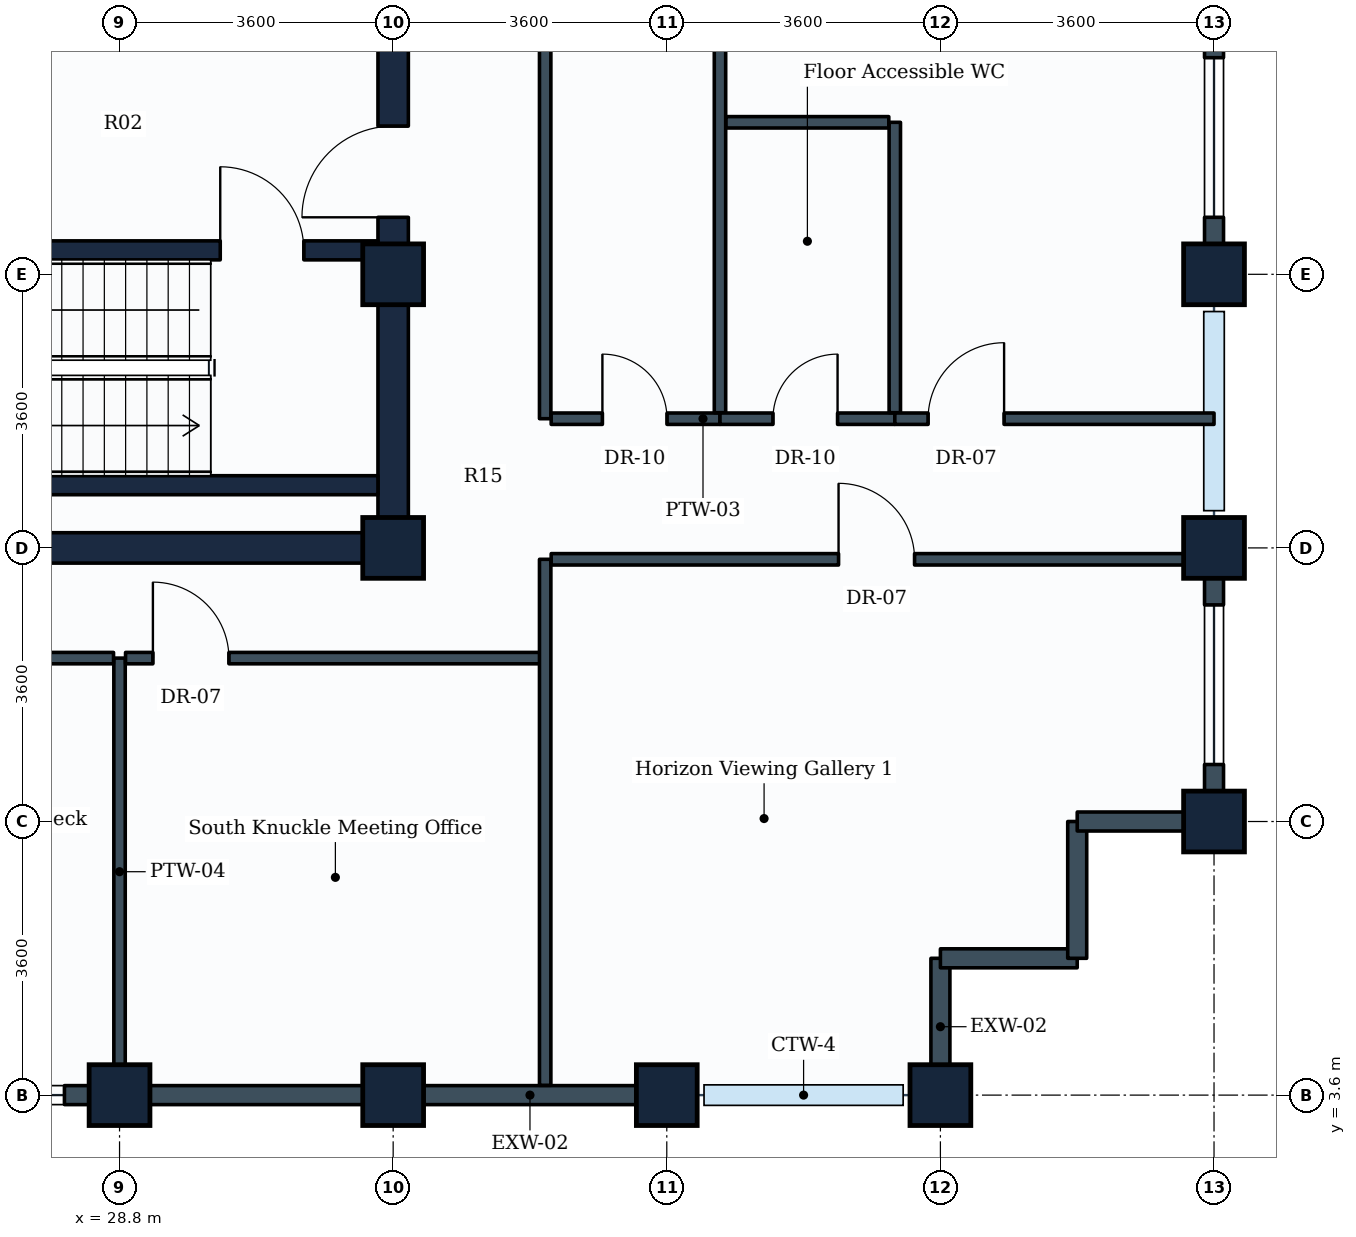
"""IFC4 building model, lengths in metres.
Left out: names, types, materials, properties, quantities, classifications, styles, units other than length and angle.
Written with IfcOpenShell. Run it as: python <this file> out.ifc"""

import sys

from ifc_helpers import new_model, si_unit, direction, frame, frame_2d, origin, origin_2d, place, context, subcontext, project, spatial, rectangle, extrude, element, fill, save


model = new_model("IFC4")
c1 = context("Model", 3, precision=1e-05, world=origin(), true_north=direction((0.0, 1.0)))
c2 = subcontext(c1, "Body", "Model", "MODEL_VIEW")
j1 = project(units=[si_unit("LENGTHUNIT", "METRE"), si_unit("PLANEANGLEUNIT", "RADIAN")], contexts=[c1])
p1 = place(None, origin())
s1 = spatial("IfcSite", under=j1, at=p1, CompositionType="ELEMENT")
p2 = place(p1, origin())
s2 = spatial("IfcBuilding", under=s1, at=p2, CompositionType="ELEMENT")
p3 = place(p2, frame((0.0, 0.0, 299.8)))
s3 = spatial("IfcBuildingStorey", under=s2, at=p3, CompositionType="ELEMENT", Elevation=299.8)
for number, where, z_axis, x_axis in (
    (1, (28.8, 3.6, 0.0), (0.0, 0.0, 1.0), (1.0, 0.0, 0.0)),
    (2, (32.4, 3.6, 0.0), (0.0, 0.0, 1.0), (1.0, 0.0, 0.0)),
    (3, (32.4, 10.8, 0.0), (0.0, 0.0, 1.0), (1.0, 0.0, 0.0)),
    (4, (32.4, 14.4, 0.0), (0.0, 0.0, 1.0), (1.0, 0.0, 0.0)),
    (5, (36.0, 3.6, 0.0), (0.0, 0.0, 1.0), (1.0, 0.0, 0.0)),
    (6, (39.6, 3.6, 0.0), (0.0, 0.0, 1.0), (1.0, 0.0, 0.0)),
    (7, (43.2, 7.2, 0.0), (0.0, 0.0, 1.0), (1.0, 0.0, 0.0)),
    (8, (43.2, 10.8, 0.0), (0.0, 0.0, 1.0), (0.0, 1.0, 0.0)),
    (9, (43.2, 14.4, 0.0), (0.0, 0.0, 1.0), (0.0, 1.0, 0.0)),
):
    element("IfcColumn", number, at=place(p3, frame(where, z_axis=z_axis, x_axis=x_axis)), inside=s3, PredefinedType="COLUMN", context=c2, shape_type="SweptSolid", body=[
        extrude(rectangle(XDim=0.8, YDim=0.8, at=origin_2d()), origin(), (0.0, 0.0, 1.0), 4.4),
    ])
p4 = place(p3, frame((28.8, 3.6, 0.0), z_axis=(0.0, 0.0, 1.0), x_axis=(-1.0, 0.0, 0.0)))
e10 = element("IfcWall", 10, at=p4, inside=s3, PredefinedType="STANDARD", context=c2, shape_type="SweptSolid", body=[
    extrude(rectangle(XDim=3.6, YDim=0.25, at=frame_2d((1.8, 0.0))), origin(), (0.0, 0.0, 1.0), 2.58),
])
p5 = place(p4, frame((0.725, 0.0, 0.85)))
e11 = element("IfcOpeningElement", 11, at=p5, cuts=e10, PredefinedType="OPENING", context=c2, shape_type="SweptSolid", body=[
    extrude(rectangle(XDim=2.1, YDim=1.35, at=frame_2d((1.05, 0.675))), frame((0.0, 0.135, 0.0), z_axis=(0.0, -1.0, 0.0), x_axis=(1.0, 0.0, 0.0)), (0.0, 0.0, 1.0), 0.27),
])
p6 = place(p3, frame((32.4, 3.6, 0.0), z_axis=(0.0, 0.0, 1.0), x_axis=(-1.0, 0.0, 0.0)))
e12 = element("IfcWall", 12, at=p6, inside=s3, PredefinedType="STANDARD", context=c2, shape_type="SweptSolid", body=[
    extrude(rectangle(XDim=3.6, YDim=0.25, at=frame_2d((1.8, 0.0))), origin(), (0.0, 0.0, 1.0), 2.58),
])
p7 = place(p3, frame((36.0, 3.6, 0.0), z_axis=(0.0, 0.0, 1.0), x_axis=(-1.0, 0.0, 0.0)))
e13 = element("IfcWall", 13, at=p7, inside=s3, PredefinedType="STANDARD", context=c2, shape_type="SweptSolid", body=[
    extrude(rectangle(XDim=3.6, YDim=0.25, at=frame_2d((1.8, 0.0))), origin(), (0.0, 0.0, 1.0), 2.58),
])
for number, where, z_axis, x_axis in (
    (14, (39.6, 5.4, 0.0), (0.0, 0.0, 1.0), (0.0, -1.0, 0.0)),
    (15, (41.4, 5.4, 0.0), (0.0, 0.0, 1.0), (-1.0, 0.0, 0.0)),
):
    element("IfcWall", number, at=place(p3, frame(where, z_axis=z_axis, x_axis=x_axis)), inside=s3, PredefinedType="STANDARD", context=c2, shape_type="SweptSolid", body=[
        extrude(rectangle(XDim=1.8, YDim=0.25, at=frame_2d((0.9, 0.0))), origin(), (0.0, 0.0, 1.0), 4.135),
    ])
for number, where, z_axis, x_axis in (
    (16, (41.4, 7.2, 0.0), (0.0, 0.0, 1.0), (0.0, -1.0, 0.0)),
    (17, (43.2, 7.2, 0.0), (0.0, 0.0, 1.0), (-1.0, 0.0, 0.0)),
):
    element("IfcWall", number, at=place(p3, frame(where, z_axis=z_axis, x_axis=x_axis)), inside=s3, PredefinedType="STANDARD", context=c2, shape_type="SweptSolid", body=[
        extrude(rectangle(XDim=1.8, YDim=0.25, at=frame_2d((0.9, 0.0))), origin(), (0.0, 0.0, 1.0), 4.135),
    ])
p8 = place(p3, frame((43.2, 10.8, 0.0), z_axis=(0.0, 0.0, 1.0), x_axis=(0.0, -1.0, 0.0)))
e18 = element("IfcWall", 18, at=p8, inside=s3, PredefinedType="STANDARD", context=c2, shape_type="SweptSolid", body=[
    extrude(rectangle(XDim=3.6, YDim=0.25, at=frame_2d((1.8, 0.0))), origin(), (0.0, 0.0, 1.0), 2.58),
])
p9 = place(p8, frame((0.75, 0.0, 0.85)))
e19 = element("IfcOpeningElement", 19, at=p9, cuts=e18, PredefinedType="OPENING", context=c2, shape_type="SweptSolid", body=[
    extrude(rectangle(XDim=2.1, YDim=1.35, at=frame_2d((1.05, 0.675))), frame((0.0, 0.135, 0.0), z_axis=(0.0, -1.0, 0.0), x_axis=(1.0, 0.0, 0.0)), (0.0, 0.0, 1.0), 0.27),
])
p10 = place(p3, frame((43.2, 18.0, 0.0), z_axis=(0.0, 0.0, 1.0), x_axis=(0.0, -1.0, 0.0)))
e20 = element("IfcWall", 20, at=p10, inside=s3, PredefinedType="STANDARD", context=c2, shape_type="SweptSolid", body=[
    extrude(rectangle(XDim=3.6, YDim=0.25, at=frame_2d((1.8, 0.0))), origin(), (0.0, 0.0, 1.0), 2.58),
])
p11 = place(p10, frame((0.75, 0.0, 0.85)))
e21 = element("IfcOpeningElement", 21, at=p11, cuts=e20, PredefinedType="OPENING", context=c2, shape_type="SweptSolid", body=[
    extrude(rectangle(XDim=2.1, YDim=1.35, at=frame_2d((1.05, 0.675))), frame((0.0, 0.135, 0.0), z_axis=(0.0, -1.0, 0.0), x_axis=(1.0, 0.0, 0.0)), (0.0, 0.0, 1.0), 0.27),
])
p12 = place(p3, frame((14.4, 10.8, 0.0), z_axis=(0.0, 0.0, 1.0), x_axis=(1.0, 0.0, 0.0)))
e22 = element("IfcWall", 22, at=p12, inside=s3, PredefinedType="SHEAR", context=c2, shape_type="SweptSolid", body=[
    extrude(rectangle(XDim=18.0, YDim=0.4, at=frame_2d((9.0, 0.0))), origin(), (0.0, 0.0, 1.0), 4.15),
])
p13 = place(p3, frame((32.4, 10.8, 0.0), z_axis=(0.0, 0.0, 1.0), x_axis=(0.0, 1.0, 0.0)))
e23 = element("IfcWall", 23, at=p13, inside=s3, PredefinedType="SHEAR", context=c2, shape_type="SweptSolid", body=[
    extrude(rectangle(XDim=14.4, YDim=0.4, at=frame_2d((7.2, 0.0))), origin(), (0.0, 0.0, 1.0), 4.15),
])
p14 = place(p13, frame((4.35, 0.0, 0.0)))
e24 = element("IfcOpeningElement", 24, at=p14, cuts=e23, PredefinedType="OPENING", context=c2, shape_type="SweptSolid", body=[
    extrude(rectangle(XDim=1.2, YDim=2.1, at=frame_2d((0.6, 1.05))), frame((0.0, 0.21, 0.0), z_axis=(0.0, -1.0, 0.0), x_axis=(1.0, 0.0, 0.0)), (0.0, 0.0, 1.0), 0.42),
])
p15 = place(p13, frame((10.0, 0.0, 0.0)))
e25 = element("IfcOpeningElement", 25, at=p15, cuts=e23, PredefinedType="OPENING", context=c2, shape_type="SweptSolid", body=[
    extrude(rectangle(XDim=1.2, YDim=2.1, at=frame_2d((0.6, 1.05))), frame((0.0, 0.21, 0.0), z_axis=(0.0, -1.0, 0.0), x_axis=(1.0, 0.0, 0.0)), (0.0, 0.0, 1.0), 0.42),
])
p16 = place(p3, frame((23.35, 11.625, 0.0), z_axis=(0.0, 0.0, 1.0), x_axis=(1.0, 0.0, 0.0)))
e26 = element("IfcWall", 26, at=p16, inside=s3, PredefinedType="SHEAR", context=c2, shape_type="SweptSolid", body=[
    extrude(rectangle(XDim=8.85, YDim=0.25, at=frame_2d((4.425, 0.0))), origin(), (0.0, 0.0, 1.0), 4.15),
])
p17 = place(p3, frame((23.35, 14.715, 0.0), z_axis=(0.0, 0.0, 1.0), x_axis=(1.0, 0.0, 0.0)))
e27 = element("IfcWall", 27, at=p17, inside=s3, PredefinedType="SHEAR", context=c2, shape_type="SweptSolid", body=[
    extrude(rectangle(XDim=8.85, YDim=0.25, at=frame_2d((4.425, 0.0))), origin(), (0.0, 0.0, 1.0), 4.15),
])
p18 = place(p17, frame((6.775, 0.0, 0.0)))
e28 = element("IfcOpeningElement", 28, at=p18, cuts=e27, PredefinedType="OPENING", context=c2, shape_type="SweptSolid", body=[
    extrude(rectangle(XDim=1.1, YDim=2.1, at=frame_2d((0.55, 1.05))), frame((0.0, 0.135, 0.0), z_axis=(0.0, -1.0, 0.0), x_axis=(1.0, 0.0, 0.0)), (0.0, 0.0, 1.0), 0.27),
])
p19 = place(p3, frame((34.4, 12.5, 0.0), z_axis=(0.0, 0.0, 1.0), x_axis=(0.0, 1.0, 0.0)))
e29 = element("IfcWall", 29, at=p19, inside=s3, PredefinedType="PARTITIONING", context=c2, shape_type="SweptSolid", body=[
    extrude(rectangle(XDim=12.7, YDim=0.15, at=frame_2d((6.35, 0.0))), origin(), (0.0, 0.0, 1.0), 2.58),
])
p20 = place(p3, frame((34.479, 12.5, 0.0), z_axis=(0.0, 0.0, 1.0), x_axis=(1.0, 0.0, 0.0)))
e30 = element("IfcWall", 30, at=p20, inside=s3, PredefinedType="PARTITIONING", context=c2, shape_type="SweptSolid", body=[
    extrude(rectangle(XDim=2.221, YDim=0.15, at=frame_2d((1.11, 0.0))), origin(), (0.0, 0.0, 1.0), 4.135),
])
p21 = place(p20, frame((0.674, 0.0, 0.0)))
e31 = element("IfcOpeningElement", 31, at=p21, cuts=e30, PredefinedType="OPENING", context=c2, shape_type="SweptSolid", body=[
    extrude(rectangle(XDim=0.85, YDim=2.1, at=frame_2d((0.425, 1.05))), frame((0.0, 0.085, 0.0), z_axis=(0.0, -1.0, 0.0), x_axis=(1.0, 0.0, 0.0)), (0.0, 0.0, 1.0), 0.17),
])
p22 = place(p3, frame((36.7, 12.579, 0.0), z_axis=(0.0, 0.0, 1.0), x_axis=(0.0, 1.0, 0.0)))
e32 = element("IfcWall", 32, at=p22, inside=s3, PredefinedType="PARTITIONING", context=c2, shape_type="SweptSolid", body=[
    extrude(rectangle(XDim=12.492, YDim=0.15, at=frame_2d((6.246, 0.0))), origin(), (0.0, 0.0, 1.0), 2.58),
])
p23 = place(p3, frame((36.7, 12.5, 0.0), z_axis=(0.0, 0.0, 1.0), x_axis=(1.0, 0.0, 0.0)))
e33 = element("IfcWall", 33, at=p23, inside=s3, PredefinedType="PARTITIONING", context=c2, shape_type="SweptSolid", body=[
    extrude(rectangle(XDim=2.3, YDim=0.15, at=frame_2d((1.15, 0.0))), origin(), (0.0, 0.0, 1.0), 4.135),
])
p24 = place(p23, frame((0.697, 0.0, 0.0)))
e34 = element("IfcOpeningElement", 34, at=p24, cuts=e33, PredefinedType="OPENING", context=c2, shape_type="SweptSolid", body=[
    extrude(rectangle(XDim=0.85, YDim=2.1, at=frame_2d((0.425, 1.05))), frame((0.0, 0.085, 0.0), z_axis=(0.0, -1.0, 0.0), x_axis=(1.0, 0.0, 0.0)), (0.0, 0.0, 1.0), 0.17),
])
p25 = place(p3, frame((39.0, 12.579, 0.0), z_axis=(0.0, 0.0, 1.0), x_axis=(0.0, 1.0, 0.0)))
e35 = element("IfcWall", 35, at=p25, inside=s3, PredefinedType="PARTITIONING", context=c2, shape_type="SweptSolid", body=[
    extrude(rectangle(XDim=3.821, YDim=0.15, at=frame_2d((1.91, 0.0))), origin(), (0.0, 0.0, 1.0), 2.58),
])
p26 = place(p3, frame((36.779, 16.4, 0.0), z_axis=(0.0, 0.0, 1.0), x_axis=(1.0, 0.0, 0.0)))
e36 = element("IfcWall", 36, at=p26, inside=s3, PredefinedType="PARTITIONING", context=c2, shape_type="SweptSolid", body=[
    extrude(rectangle(XDim=2.142, YDim=0.15, at=frame_2d((1.071, 0.0))), origin(), (0.0, 0.0, 1.0), 4.135),
])
p27 = place(p3, frame((28.8, 9.35, 0.0), z_axis=(0.0, 0.0, 1.0), x_axis=(0.0, -1.0, 0.0)))
e37 = element("IfcWall", 37, at=p27, inside=s3, PredefinedType="PARTITIONING", context=c2, shape_type="SweptSolid", body=[
    extrude(rectangle(XDim=5.621, YDim=0.15, at=frame_2d((2.811, 0.0))), origin(), (0.0, 0.0, 1.0), 2.58),
])
p28 = place(p3, frame((13.08, 9.35, 0.0), z_axis=(0.0, 0.0, 1.0), x_axis=(1.0, 0.0, 0.0)))
e38 = element("IfcWall", 38, at=p28, inside=s3, PredefinedType="PARTITIONING", context=c2, shape_type="SweptSolid", body=[
    extrude(rectangle(XDim=15.641, YDim=0.15, at=frame_2d((7.82, 0.0))), origin(), (0.0, 0.0, 1.0), 2.58),
])
p29 = place(p3, frame((28.879, 9.35, 0.0), z_axis=(0.0, 0.0, 1.0), x_axis=(1.0, 0.0, 0.0)))
e39 = element("IfcWall", 39, at=p29, inside=s3, PredefinedType="PARTITIONING", context=c2, shape_type="SweptSolid", body=[
    extrude(rectangle(XDim=5.521, YDim=0.15, at=frame_2d((2.76, 0.0))), origin(), (0.0, 0.0, 1.0), 2.58),
])
p30 = place(p29, frame((0.36, 0.0, 0.0)))
e40 = element("IfcOpeningElement", 40, at=p30, cuts=e39, PredefinedType="OPENING", context=c2, shape_type="SweptSolid", body=[
    extrude(rectangle(XDim=1.0, YDim=2.1, at=frame_2d((0.5, 1.05))), frame((0.0, 0.085, 0.0), z_axis=(0.0, -1.0, 0.0), x_axis=(1.0, 0.0, 0.0)), (0.0, 0.0, 1.0), 0.17),
])
p31 = place(p3, frame((34.4, 3.729, 0.0), z_axis=(0.0, 0.0, 1.0), x_axis=(0.0, 1.0, 0.0)))
e41 = element("IfcWall", 41, at=p31, inside=s3, PredefinedType="PARTITIONING", context=c2, shape_type="SweptSolid", body=[
    extrude(rectangle(XDim=6.921, YDim=0.15, at=frame_2d((3.46, 0.0))), origin(), (0.0, 0.0, 1.0), 2.58),
])
p32 = place(p3, frame((34.479, 10.65, 0.0), z_axis=(0.0, 0.0, 1.0), x_axis=(1.0, 0.0, 0.0)))
e42 = element("IfcWall", 42, at=p32, inside=s3, PredefinedType="PARTITIONING", context=c2, shape_type="SweptSolid", body=[
    extrude(rectangle(XDim=8.592, YDim=0.15, at=frame_2d((4.296, 0.0))), origin(), (0.0, 0.0, 1.0), 2.58),
])
p33 = place(p32, frame((3.781, 0.0, 0.0)))
e43 = element("IfcOpeningElement", 43, at=p33, cuts=e42, PredefinedType="OPENING", context=c2, shape_type="SweptSolid", body=[
    extrude(rectangle(XDim=1.0, YDim=2.1, at=frame_2d((0.5, 1.05))), frame((0.0, 0.085, 0.0), z_axis=(0.0, -1.0, 0.0), x_axis=(1.0, 0.0, 0.0)), (0.0, 0.0, 1.0), 0.17),
])
p34 = place(p3, frame((39.0, 12.5, 0.0), z_axis=(0.0, 0.0, 1.0), x_axis=(1.0, 0.0, 0.0)))
e44 = element("IfcWall", 44, at=p34, inside=s3, PredefinedType="PARTITIONING", context=c2, shape_type="SweptSolid", body=[
    extrude(rectangle(XDim=4.2, YDim=0.15, at=frame_2d((2.1, 0.0))), origin(), (0.0, 0.0, 1.0), 2.58),
])
p35 = place(p34, frame((0.438, 0.0, 0.0)))
e45 = element("IfcOpeningElement", 45, at=p35, cuts=e44, PredefinedType="OPENING", context=c2, shape_type="SweptSolid", body=[
    extrude(rectangle(XDim=1.0, YDim=2.1, at=frame_2d((0.5, 1.05))), frame((0.0, 0.085, 0.0), z_axis=(0.0, -1.0, 0.0), x_axis=(1.0, 0.0, 0.0)), (0.0, 0.0, 1.0), 0.17),
])
p36 = place(p5, origin())
e46 = element("IfcWindow", 46, at=p36, inside=s3, PartitioningType="SINGLE_PANEL", PredefinedType="WINDOW", context=c2, shape_type="SweptSolid", body=[
    extrude(rectangle(XDim=2.1, YDim=1.35, at=frame_2d((1.05, 0.675))), frame((0.0, 0.03, 0.0), z_axis=(0.0, -1.0, 0.0), x_axis=(1.0, 0.0, 0.0)), (0.0, 0.0, 1.0), 0.06),
])
fill(e11, e46)
p37 = place(p9, origin())
e47 = element("IfcWindow", 47, at=p37, inside=s3, PartitioningType="SINGLE_PANEL", PredefinedType="WINDOW", context=c2, shape_type="SweptSolid", body=[
    extrude(rectangle(XDim=2.1, YDim=1.35, at=frame_2d((1.05, 0.675))), frame((0.0, 0.03, 0.0), z_axis=(0.0, -1.0, 0.0), x_axis=(1.0, 0.0, 0.0)), (0.0, 0.0, 1.0), 0.06),
])
fill(e19, e47)
p38 = place(p11, origin())
e48 = element("IfcWindow", 48, at=p38, inside=s3, PartitioningType="SINGLE_PANEL", PredefinedType="WINDOW", context=c2, shape_type="SweptSolid", body=[
    extrude(rectangle(XDim=2.1, YDim=1.35, at=frame_2d((1.05, 0.675))), frame((0.0, 0.03, 0.0), z_axis=(0.0, -1.0, 0.0), x_axis=(1.0, 0.0, 0.0)), (0.0, 0.0, 1.0), 0.06),
])
fill(e21, e48)
p39 = place(p18, origin())
e49 = element("IfcDoor", 49, at=p39, inside=s3, OperationType="SINGLE_SWING_LEFT", PredefinedType="DOOR", context=c2, shape_type="SweptSolid", body=[
    extrude(rectangle(XDim=1.1, YDim=2.1, at=frame_2d((0.55, 1.05))), frame((0.0, 0.025, 0.0), z_axis=(0.0, -1.0, 0.0), x_axis=(1.0, 0.0, 0.0)), (0.0, 0.0, 1.0), 0.05),
])
fill(e28, e49)
p40 = place(p14, origin())
e50 = element("IfcDoor", 50, at=p40, inside=s3, OperationType="SINGLE_SWING_LEFT", PredefinedType="DOOR", context=c2, shape_type="SweptSolid", body=[
    extrude(rectangle(XDim=1.2, YDim=2.1, at=frame_2d((0.6, 1.05))), frame((0.0, 0.025, 0.0), z_axis=(0.0, -1.0, 0.0), x_axis=(1.0, 0.0, 0.0)), (0.0, 0.0, 1.0), 0.05),
])
fill(e24, e50)
p41 = place(p21, origin())
e51 = element("IfcDoor", 51, at=p41, inside=s3, OperationType="SINGLE_SWING_LEFT", PredefinedType="DOOR", context=c2, shape_type="SweptSolid", body=[
    extrude(rectangle(XDim=0.85, YDim=2.1, at=frame_2d((0.425, 1.05))), frame((0.0, 0.025, 0.0), z_axis=(0.0, -1.0, 0.0), x_axis=(1.0, 0.0, 0.0)), (0.0, 0.0, 1.0), 0.05),
])
fill(e31, e51)
p42 = place(p24, origin())
e52 = element("IfcDoor", 52, at=p42, inside=s3, OperationType="SINGLE_SWING_RIGHT", PredefinedType="DOOR", context=c2, shape_type="SweptSolid", body=[
    extrude(rectangle(XDim=0.85, YDim=2.1, at=frame_2d((0.425, 1.05))), frame((0.0, 0.025, 0.0), z_axis=(0.0, -1.0, 0.0), x_axis=(1.0, 0.0, 0.0)), (0.0, 0.0, 1.0), 0.05),
])
fill(e34, e52)
p43 = place(p30, origin())
e53 = element("IfcDoor", 53, at=p43, inside=s3, OperationType="SINGLE_SWING_LEFT", PredefinedType="DOOR", context=c2, shape_type="SweptSolid", body=[
    extrude(rectangle(XDim=1.0, YDim=2.1, at=frame_2d((0.5, 1.05))), frame((0.0, 0.025, 0.0), z_axis=(0.0, -1.0, 0.0), x_axis=(1.0, 0.0, 0.0)), (0.0, 0.0, 1.0), 0.05),
])
fill(e40, e53)
p44 = place(p33, origin())
e54 = element("IfcDoor", 54, at=p44, inside=s3, OperationType="SINGLE_SWING_LEFT", PredefinedType="DOOR", context=c2, shape_type="SweptSolid", body=[
    extrude(rectangle(XDim=1.0, YDim=2.1, at=frame_2d((0.5, 1.05))), frame((0.0, 0.025, 0.0), z_axis=(0.0, -1.0, 0.0), x_axis=(1.0, 0.0, 0.0)), (0.0, 0.0, 1.0), 0.05),
])
fill(e43, e54)
p45 = place(p35, origin())
e55 = element("IfcDoor", 55, at=p45, inside=s3, OperationType="SINGLE_SWING_RIGHT", PredefinedType="DOOR", context=c2, shape_type="SweptSolid", body=[
    extrude(rectangle(XDim=1.0, YDim=2.1, at=frame_2d((0.5, 1.05))), frame((0.0, 0.025, 0.0), z_axis=(0.0, -1.0, 0.0), x_axis=(1.0, 0.0, 0.0)), (0.0, 0.0, 1.0), 0.05),
])
fill(e45, e55)
save(model, sys.argv[1])
